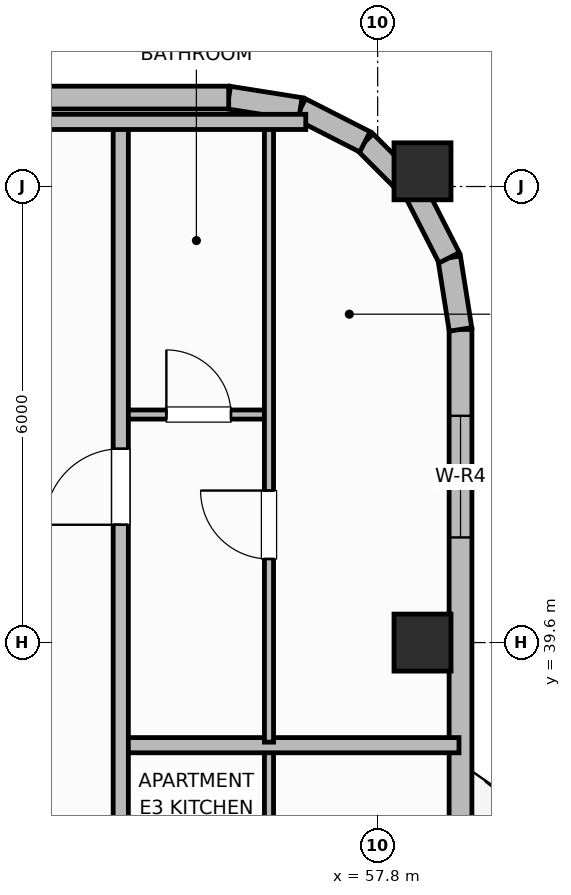
"""IFC4 building model, lengths in metres.
Left out: names, types, materials, properties, quantities, classifications, styles, units other than length and angle.
Written with IfcOpenShell. Run it as: python <this file> out.ifc"""

import sys

from ifc_helpers import new_model, si_unit, direction, frame, frame_2d, origin, origin_2d, place, context, subcontext, project, spatial, rectangle, extrude, element, fill, save


model = new_model("IFC4")
c1 = context("Model", 3, precision=1e-05, world=origin(), true_north=direction((0.0, 1.0)))
c2 = subcontext(c1, "Body", "Model", "MODEL_VIEW")
j1 = project(units=[si_unit("LENGTHUNIT", "METRE"), si_unit("PLANEANGLEUNIT", "RADIAN")], contexts=[c1])
p1 = place(None, origin())
s1 = spatial("IfcSite", under=j1, at=p1, CompositionType="ELEMENT")
p2 = place(p1, origin())
s2 = spatial("IfcBuilding", under=s1, at=p2, CompositionType="ELEMENT")
p3 = place(p2, frame((0.0, 0.0, 275.0)))
s3 = spatial("IfcBuildingStorey", under=s2, at=p3, CompositionType="ELEMENT", Elevation=275.0)
for number, where, z_axis, x_axis in (
    (1, (58.39, 39.6, 0.0), (0.0, 0.0, 1.0), (1.0, 0.0, 0.0)),
    (2, (58.39, 45.8, 0.0), (0.0, 0.0, 1.0), (1.0, 0.0, 0.0)),
):
    element("IfcColumn", number, at=place(p3, frame(where, z_axis=z_axis, x_axis=x_axis)), inside=s3, PredefinedType="COLUMN", context=c2, shape_type="SweptSolid", body=[
        extrude(rectangle(XDim=0.75, YDim=0.75, at=origin_2d()), origin(), (0.0, 0.0, 1.0), 3.7),
    ])
p4 = place(p3, frame((58.89, 32.6, 0.0), z_axis=(0.0, 0.0, 1.0), x_axis=(0.0, 1.0, 0.0)))
e3 = element("IfcWall", 3, at=p4, inside=s3, PredefinedType="SOLIDWALL", context=c2, shape_type="SweptSolid", body=[
    extrude(rectangle(XDim=11.12, YDim=0.3, at=frame_2d((5.56, 0.0))), origin(), (0.0, 0.0, 1.0), 2.73),
])
p5 = place(p4, frame((2.1, 0.0, 0.0)))
e4 = element("IfcOpeningElement", 4, at=p5, cuts=e3, PredefinedType="OPENING", context=c2, shape_type="SweptSolid", body=[
    extrude(rectangle(XDim=1.6, YDim=2.1, at=frame_2d((0.8, 1.05))), frame((0.0, 0.16, 0.0), z_axis=(0.0, -1.0, 0.0), x_axis=(1.0, 0.0, 0.0)), (0.0, 0.0, 1.0), 0.32),
])
p6 = place(p4, frame((8.383, 0.0, 0.71)))
e5 = element("IfcOpeningElement", 5, at=p6, cuts=e3, PredefinedType="OPENING", context=c2, shape_type="SweptSolid", body=[
    extrude(rectangle(XDim=1.6, YDim=1.9, at=frame_2d((0.8, 0.95))), frame((0.0, 0.16, 0.0), z_axis=(0.0, -1.0, 0.0), x_axis=(1.0, 0.0, 0.0)), (0.0, 0.0, 1.0), 0.32),
])
p7 = place(p3, frame((58.89, 43.72, 0.0), z_axis=(0.0, 0.0, 1.0), x_axis=(-0.156304114255, 0.987708977314, 0.0)))
e6 = element("IfcWall", 6, at=p7, inside=s3, PredefinedType="SOLIDWALL", context=c2, shape_type="SweptSolid", body=[
    extrude(rectangle(XDim=0.954, YDim=0.3, at=frame_2d((0.477, 0.0))), origin(), (0.0, 0.0, 1.0), 2.73),
])
p8 = place(p3, frame((58.741, 44.663, 0.0), z_axis=(0.0, 0.0, 1.0), x_axis=(-0.45395644796, 0.891023873617, 0.0)))
e7 = element("IfcWall", 7, at=p8, inside=s3, PredefinedType="SOLIDWALL", context=c2, shape_type="SweptSolid", body=[
    extrude(rectangle(XDim=0.954, YDim=0.3, at=frame_2d((0.477, 0.0))), origin(), (0.0, 0.0, 1.0), 2.73),
])
for number, where, z_axis, x_axis in (
    (8, (58.308, 45.513, 0.0), (0.0, 0.0, 1.0), (-0.707, 0.707, 0.0)),
    (9, (57.633, 46.188, 0.0), (0.0, 0.0, 1.0), (-0.891, 0.454, 0.0)),
):
    element("IfcWall", number, at=place(p3, frame(where, z_axis=z_axis, x_axis=x_axis)), inside=s3, PredefinedType="SOLIDWALL", context=c2, shape_type="SweptSolid", body=[
        extrude(rectangle(XDim=0.954, YDim=0.3, at=frame_2d((0.477, 0.0))), origin(), (0.0, 0.0, 1.0), 2.73),
    ])
p9 = place(p3, frame((56.782, 46.621, 0.0), z_axis=(0.0, 0.0, 1.0), x_axis=(-0.987663181641, 0.156593229835, 0.0)))
e10 = element("IfcWall", 10, at=p9, inside=s3, PredefinedType="SOLIDWALL", context=c2, shape_type="SweptSolid", body=[
    extrude(rectangle(XDim=0.954, YDim=0.3, at=frame_2d((0.477, 0.0))), origin(), (0.0, 0.0, 1.0), 2.73),
])
p10 = place(p3, frame((55.84, 46.77, 0.0), z_axis=(0.0, 0.0, 1.0), x_axis=(-1.0, 0.0, 0.0)))
e11 = element("IfcWall", 11, at=p10, inside=s3, PredefinedType="SOLIDWALL", context=c2, shape_type="SweptSolid", body=[
    extrude(rectangle(XDim=4.45, YDim=0.3, at=frame_2d((2.225, 0.0))), origin(), (0.0, 0.0, 1.0), 2.73),
])
p11 = place(p3, frame((56.37, 32.79, 0.0), z_axis=(0.0, 0.0, 1.0), x_axis=(0.0, 1.0, 0.0)))
e12 = element("IfcWall", 12, at=p11, inside=s3, PredefinedType="PARTITIONING", context=c2, shape_type="SweptSolid", body=[
    extrude(rectangle(XDim=5.42, YDim=0.12, at=frame_2d((2.71, 0.0))), origin(), (0.0, 0.0, 1.0), 2.56),
])
p12 = place(p11, frame((0.61, 0.0, 0.0)))
e13 = element("IfcOpeningElement", 13, at=p12, cuts=e12, PredefinedType="OPENING", context=c2, shape_type="SweptSolid", body=[
    extrude(rectangle(XDim=0.9, YDim=2.1, at=frame_2d((0.45, 1.05))), frame((0.0, 0.07, 0.0), z_axis=(0.0, -1.0, 0.0), x_axis=(1.0, 0.0, 0.0)), (0.0, 0.0, 1.0), 0.14),
])
p13 = place(p3, frame((54.42, 38.25, 0.0), z_axis=(0.0, 0.0, 1.0), x_axis=(1.0, 0.0, 0.0)))
e14 = element("IfcWall", 14, at=p13, inside=s3, PredefinedType="PARTITIONING", context=c2, shape_type="SweptSolid", body=[
    extrude(rectangle(XDim=4.45, YDim=0.2, at=frame_2d((2.225, 0.0))), origin(), (0.0, 0.0, 1.0), 2.56),
])
p14 = place(p3, frame((54.42, 42.6, 0.0), z_axis=(0.0, 0.0, 1.0), x_axis=(1.0, 0.0, 0.0)))
e15 = element("IfcWall", 15, at=p14, inside=s3, PredefinedType="PARTITIONING", context=c2, shape_type="SweptSolid", body=[
    extrude(rectangle(XDim=1.95, YDim=0.12, at=frame_2d((0.975, 0.0))), origin(), (0.0, 0.0, 1.0), 2.56),
])
p15 = place(p14, frame((0.6, 0.0, 0.0)))
e16 = element("IfcOpeningElement", 16, at=p15, cuts=e15, PredefinedType="OPENING", context=c2, shape_type="SweptSolid", body=[
    extrude(rectangle(XDim=0.85, YDim=2.1, at=frame_2d((0.425, 1.05))), frame((0.0, 0.07, 0.0), z_axis=(0.0, -1.0, 0.0), x_axis=(1.0, 0.0, 0.0)), (0.0, 0.0, 1.0), 0.14),
])
p16 = place(p3, frame((56.37, 38.29, 0.0), z_axis=(0.0, 0.0, 1.0), x_axis=(0.0, 1.0, 0.0)))
e17 = element("IfcWall", 17, at=p16, inside=s3, PredefinedType="PARTITIONING", context=c2, shape_type="SweptSolid", body=[
    extrude(rectangle(XDim=8.12, YDim=0.12, at=frame_2d((4.06, 0.0))), origin(), (0.0, 0.0, 1.0), 2.56),
])
p17 = place(p16, frame((2.41, 0.0, 0.0)))
e18 = element("IfcOpeningElement", 18, at=p17, cuts=e17, PredefinedType="OPENING", context=c2, shape_type="SweptSolid", body=[
    extrude(rectangle(XDim=0.9, YDim=2.1, at=frame_2d((0.45, 1.05))), frame((0.0, 0.07, 0.0), z_axis=(0.0, -1.0, 0.0), x_axis=(1.0, 0.0, 0.0)), (0.0, 0.0, 1.0), 0.14),
])
p18 = place(p3, frame((54.42, 9.95, 0.0), z_axis=(0.0, 0.0, 1.0), x_axis=(0.0, 1.0, 0.0)))
e19 = element("IfcWall", 19, at=p18, inside=s3, PredefinedType="PARTITIONING", context=c2, shape_type="SweptSolid", body=[
    extrude(rectangle(XDim=36.5, YDim=0.2, at=frame_2d((18.25, 0.0))), origin(), (0.0, 0.0, 1.0), 2.56),
])
p19 = place(p18, frame((3.11, 0.0, 0.0)))
e20 = element("IfcOpeningElement", 20, at=p19, cuts=e19, PredefinedType="OPENING", context=c2, shape_type="SweptSolid", body=[
    extrude(rectangle(XDim=1.0, YDim=2.15, at=frame_2d((0.5, 1.075))), frame((0.0, 0.11, 0.0), z_axis=(0.0, -1.0, 0.0), x_axis=(1.0, 0.0, 0.0)), (0.0, 0.0, 1.0), 0.22),
])
p20 = place(p18, frame((11.99, 0.0, 0.0)))
e21 = element("IfcOpeningElement", 21, at=p20, cuts=e19, PredefinedType="OPENING", context=c2, shape_type="SweptSolid", body=[
    extrude(rectangle(XDim=1.0, YDim=2.15, at=frame_2d((0.5, 1.075))), frame((0.0, 0.11, 0.0), z_axis=(0.0, -1.0, 0.0), x_axis=(1.0, 0.0, 0.0)), (0.0, 0.0, 1.0), 0.22),
])
p21 = place(p18, frame((23.5, 0.0, 0.0)))
e22 = element("IfcOpeningElement", 22, at=p21, cuts=e19, PredefinedType="OPENING", context=c2, shape_type="SweptSolid", body=[
    extrude(rectangle(XDim=1.0, YDim=2.15, at=frame_2d((0.5, 1.075))), frame((0.0, 0.11, 0.0), z_axis=(0.0, -1.0, 0.0), x_axis=(1.0, 0.0, 0.0)), (0.0, 0.0, 1.0), 0.22),
])
p22 = place(p18, frame((31.2, 0.0, 0.0)))
e23 = element("IfcOpeningElement", 23, at=p22, cuts=e19, PredefinedType="OPENING", context=c2, shape_type="SweptSolid", body=[
    extrude(rectangle(XDim=1.0, YDim=2.15, at=frame_2d((0.5, 1.075))), frame((0.0, 0.11, 0.0), z_axis=(0.0, -1.0, 0.0), x_axis=(1.0, 0.0, 0.0)), (0.0, 0.0, 1.0), 0.22),
])
p23 = place(p3, frame((53.1, 46.45, 0.0), z_axis=(0.0, 0.0, 1.0), x_axis=(1.0, 0.0, 0.0)))
e24 = element("IfcWall", 24, at=p23, inside=s3, PredefinedType="PARTITIONING", context=c2, shape_type="SweptSolid", body=[
    extrude(rectangle(XDim=3.754, YDim=0.2, at=frame_2d((1.877, 0.0))), origin(), (0.0, 0.0, 1.0), 2.56),
])
p24 = place(p6, origin())
e25 = element("IfcWindow", 25, at=p24, inside=s3, PartitioningType="SINGLE_PANEL", PredefinedType="WINDOW", context=c2, shape_type="SweptSolid", body=[
    extrude(rectangle(XDim=1.6, YDim=1.9, at=frame_2d((0.8, 0.95))), frame((0.0, 0.03, 0.0), z_axis=(0.0, -1.0, 0.0), x_axis=(1.0, 0.0, 0.0)), (0.0, 0.0, 1.0), 0.06),
])
fill(e5, e25)
p25 = place(p15, origin())
e26 = element("IfcDoor", 26, at=p25, inside=s3, OperationType="SINGLE_SWING_LEFT", PredefinedType="DOOR", context=c2, shape_type="SweptSolid", body=[
    extrude(rectangle(XDim=0.85, YDim=2.1, at=frame_2d((0.425, 1.05))), frame((0.0, 0.025, 0.0), z_axis=(0.0, -1.0, 0.0), x_axis=(1.0, 0.0, 0.0)), (0.0, 0.0, 1.0), 0.05),
])
fill(e16, e26)
p26 = place(p17, origin())
e27 = element("IfcDoor", 27, at=p26, inside=s3, OperationType="SINGLE_SWING_RIGHT", PredefinedType="DOOR", context=c2, shape_type="SweptSolid", body=[
    extrude(rectangle(XDim=0.9, YDim=2.1, at=frame_2d((0.45, 1.05))), frame((0.0, 0.025, 0.0), z_axis=(0.0, -1.0, 0.0), x_axis=(1.0, 0.0, 0.0)), (0.0, 0.0, 1.0), 0.05),
])
fill(e18, e27)
p27 = place(p22, origin())
e28 = element("IfcDoor", 28, at=p27, inside=s3, OperationType="SINGLE_SWING_LEFT", PredefinedType="DOOR", context=c2, shape_type="SweptSolid", body=[
    extrude(rectangle(XDim=1.0, YDim=2.15, at=frame_2d((0.5, 1.075))), frame((0.0, 0.025, 0.0), z_axis=(0.0, -1.0, 0.0), x_axis=(1.0, 0.0, 0.0)), (0.0, 0.0, 1.0), 0.05),
])
fill(e23, e28)
save(model, sys.argv[1])
